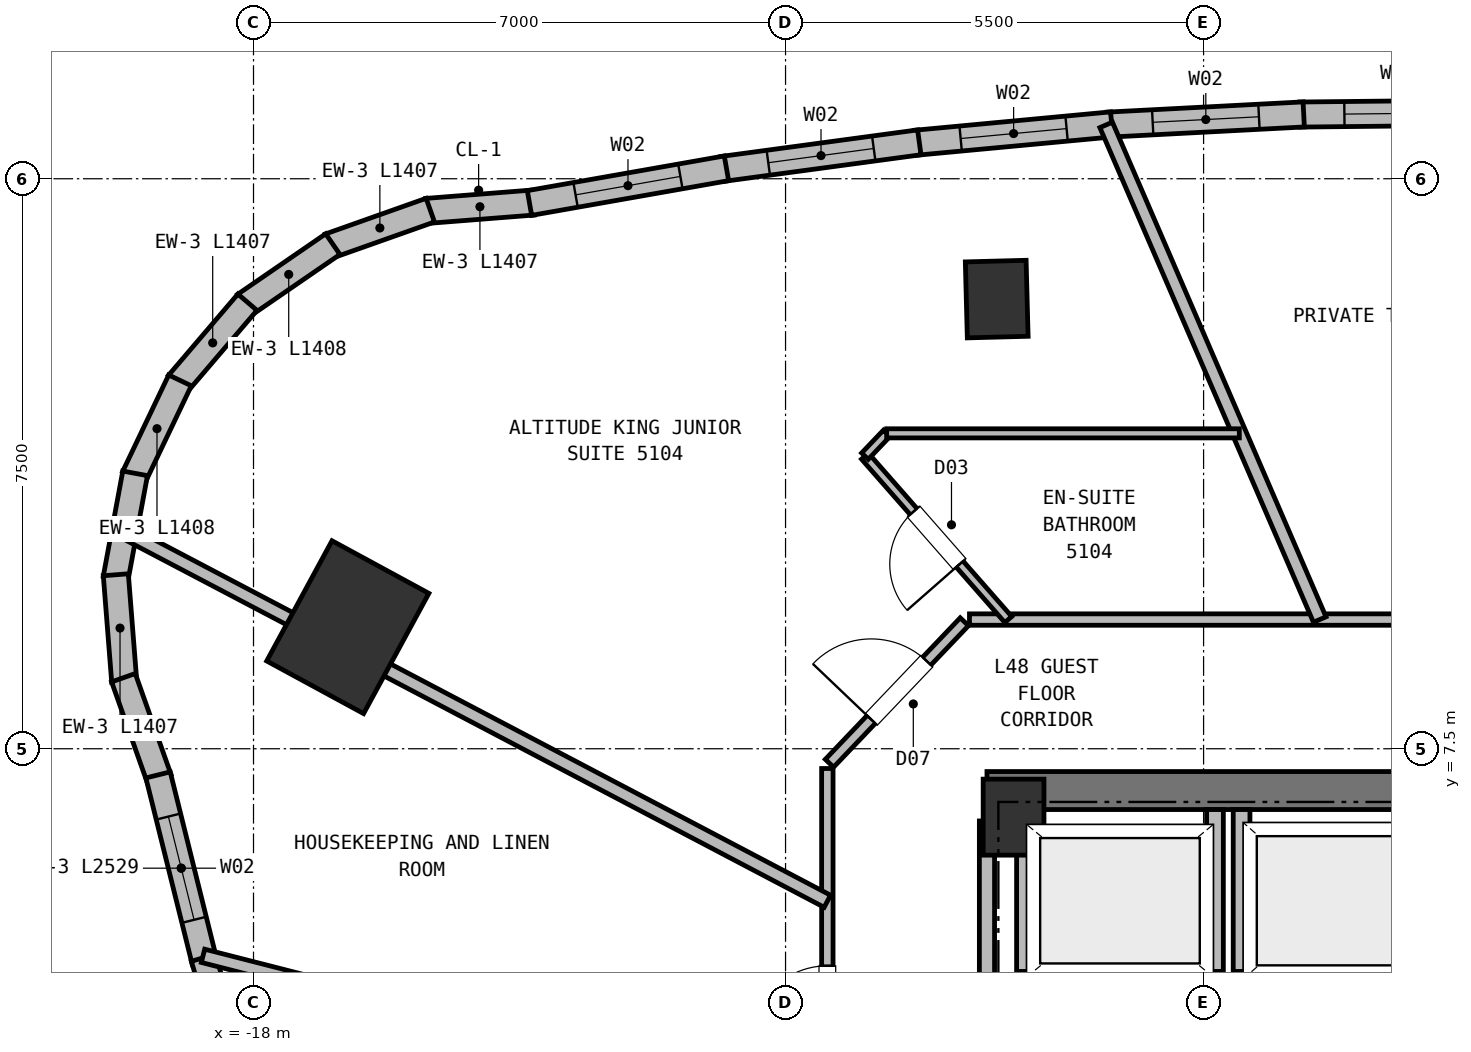
"""IFC4 building model, lengths in metres.
Left out: names, types, materials, properties, quantities, classifications, styles, units other than length and angle.
Written with IfcOpenShell. Run it as: python <this file> out.ifc"""

import sys

from ifc_helpers import new_model, si_unit, direction, frame, frame_2d, origin, origin_2d, place, context, subcontext, project, spatial, rectangle, extrude, element, fill, save


model = new_model("IFC4")
c1 = context("Model", 3, precision=1e-05, world=origin(), true_north=direction((0.0, 1.0)))
c2 = subcontext(c1, "Body", "Model", "MODEL_VIEW")
j1 = project(units=[si_unit("LENGTHUNIT", "METRE"), si_unit("PLANEANGLEUNIT", "RADIAN")], contexts=[c1])
p1 = place(None, origin())
s1 = spatial("IfcSite", under=j1, at=p1, CompositionType="ELEMENT")
p2 = place(p1, origin())
s2 = spatial("IfcBuilding", under=s1, at=p2, CompositionType="ELEMENT")
p3 = place(p2, frame((0.0, 0.0, 194.15)))
s3 = spatial("IfcBuildingStorey", under=s2, at=p3, CompositionType="ELEMENT", Elevation=194.15)
p4 = place(p3, frame((-8.0, 6.6, 0.0), z_axis=(0.0, 0.0, 1.0), x_axis=(1.0, 0.0, 0.0)))
e1 = element("IfcColumn", 1, at=p4, inside=s3, PredefinedType="COLUMN", context=c2, shape_type="SweptSolid", body=[
    extrude(rectangle(XDim=0.8, YDim=1.0, at=origin_2d()), origin(), (0.0, 0.0, 1.0), 3.8),
])
p5 = place(p3, frame((-8.35, 6.95, 0.0), z_axis=(0.0, 0.0, 1.0), x_axis=(1.0, 0.0, 0.0)))
e2 = element("IfcWall", 2, at=p5, inside=s3, PredefinedType="SHEAR", context=c2, shape_type="SweptSolid", body=[
    extrude(rectangle(XDim=16.7, YDim=0.5, at=frame_2d((8.35, 0.0))), origin(), (0.0, 0.0, 1.0), 3.55),
])
p6 = place(p3, frame((-16.76, 9.1, 0.0), z_axis=(0.0, 0.0, 1.0), x_axis=(-0.878817112662, 0.47715876026, 0.0)))
e3 = element("IfcColumn", 3, at=p6, inside=s3, PredefinedType="COLUMN", context=c2, shape_type="SweptSolid", body=[
    extrude(rectangle(XDim=1.45, YDim=1.8, at=origin_2d()), origin(), (0.0, 0.0, 1.0), 3.8),
])
p7 = place(p3, frame((-8.222, 13.417, 0.0), z_axis=(0.0, 0.0, 1.0), x_axis=(0.999657324976, 0.026176948308, 0.0)))
e4 = element("IfcColumn", 4, at=p7, inside=s3, PredefinedType="COLUMN", context=c2, shape_type="SweptSolid", body=[
    extrude(rectangle(XDim=0.8, YDim=1.0, at=origin_2d()), origin(), (0.0, 0.0, 1.0), 3.8),
])
p8 = place(p3, frame((-15.723, 14.576, 0.0), z_axis=(0.0, 0.0, 1.0), x_axis=(0.996907811278, 0.07857999626, 0.0)))
e5 = element("IfcWall", 5, at=p8, inside=s3, PredefinedType="SOLIDWALL", context=c2, shape_type="SweptSolid", body=[
    extrude(rectangle(XDim=1.407, YDim=0.33, at=frame_2d((0.704, 0.0))), origin(), (0.0, 0.0, 1.0), 3.55),
])
p9 = place(p3, frame((-17.001, 14.117, 0.0), z_axis=(0.0, 0.0, 1.0), x_axis=(0.942676111555, 0.333709077945, 0.0)))
e6 = element("IfcWall", 6, at=p9, inside=s3, PredefinedType="SOLIDWALL", context=c2, shape_type="SweptSolid", body=[
    extrude(rectangle(XDim=1.408, YDim=0.33, at=frame_2d((0.704, 0.0))), origin(), (0.0, 0.0, 1.0), 3.55),
])
for number, where, z_axis, x_axis in (
    (7, (-18.117, 13.342, 0.0), (0.0, 0.0, 1.0), (0.824, 0.566, 0.0)),
    (8, (-18.994, 12.305, 0.0), (0.0, 0.0, 1.0), (0.649, 0.76, 0.0)),
    (9, (-19.573, 11.076, 0.0), (0.0, 0.0, 1.0), (0.431, 0.902, 0.0)),
    (10, (-19.814, 9.74, 0.0), (0.0, 0.0, 1.0), (0.182, 0.983, 0.0)),
):
    element("IfcWall", number, at=place(p3, frame(where, z_axis=z_axis, x_axis=x_axis)), inside=s3, PredefinedType="SOLIDWALL", context=c2, shape_type="SweptSolid", body=[
        extrude(rectangle(XDim=1.407, YDim=0.33, at=frame_2d((0.704, 0.0))), origin(), (0.0, 0.0, 1.0), 3.55),
    ])
p10 = place(p3, frame((-19.701, 8.386, 0.0), z_axis=(0.0, 0.0, 1.0), x_axis=(-0.078566409812, 0.99690888212, 0.0)))
e11 = element("IfcWall", 11, at=p10, inside=s3, PredefinedType="SOLIDWALL", context=c2, shape_type="SweptSolid", body=[
    extrude(rectangle(XDim=1.408, YDim=0.33, at=frame_2d((0.704, 0.0))), origin(), (0.0, 0.0, 1.0), 3.55),
])
p11 = place(p3, frame((-19.241, 7.108, 0.0), z_axis=(0.0, 0.0, 1.0), x_axis=(-0.33376364871, 0.942656791627, 0.0)))
e12 = element("IfcWall", 12, at=p11, inside=s3, PredefinedType="SOLIDWALL", context=c2, shape_type="SweptSolid", body=[
    extrude(rectangle(XDim=1.407, YDim=0.33, at=frame_2d((0.704, 0.0))), origin(), (0.0, 0.0, 1.0), 3.55),
])
p12 = place(p3, frame((-18.646, 4.701, 0.0), z_axis=(0.0, 0.0, 1.0), x_axis=(-0.241149785718, 0.970487908656, 0.0)))
e13 = element("IfcWall", 13, at=p12, inside=s3, PredefinedType="SOLIDWALL", context=c2, shape_type="SweptSolid", body=[
    extrude(rectangle(XDim=2.529, YDim=0.33, at=frame_2d((1.265, 0.0))), origin(), (0.0, 0.0, 1.0), 3.55),
])
p13 = place(p12, frame((0.564, 0.0, 0.72)))
e14 = element("IfcOpeningElement", 14, at=p13, cuts=e13, PredefinedType="OPENING", context=c2, shape_type="SweptSolid", body=[
    extrude(rectangle(XDim=1.4, YDim=1.84, at=frame_2d((0.7, 0.92))), frame((0.0, 0.175, 0.0), z_axis=(0.0, -1.0, 0.0), x_axis=(1.0, 0.0, 0.0)), (0.0, 0.0, 1.0), 0.35),
])
p14 = place(p3, frame((-17.96, 2.34, 0.0), z_axis=(0.0, 0.0, 1.0), x_axis=(-0.278497522166, 0.960436947513, 0.0)))
e15 = element("IfcWall", 15, at=p14, inside=s3, PredefinedType="SOLIDWALL", context=c2, shape_type="SweptSolid", body=[
    extrude(rectangle(XDim=2.509, YDim=0.33, at=frame_2d((1.254, 0.0))), origin(), (0.0, 0.0, 1.0), 3.55),
])
p15 = place(p14, frame((0.554, 0.0, 0.72)))
e16 = element("IfcOpeningElement", 16, at=p15, cuts=e15, PredefinedType="OPENING", context=c2, shape_type="SweptSolid", body=[
    extrude(rectangle(XDim=1.4, YDim=1.84, at=frame_2d((0.7, 0.92))), frame((0.0, 0.175, 0.0), z_axis=(0.0, -1.0, 0.0), x_axis=(1.0, 0.0, 0.0)), (0.0, 0.0, 1.0), 0.35),
])
p16 = place(p3, frame((-4.233, 15.845, 0.0), z_axis=(0.0, 0.0, 1.0), x_axis=(0.999945431053, 0.010446765829, 0.0)))
e17 = element("IfcWall", 17, at=p16, inside=s3, PredefinedType="SOLIDWALL", context=c2, shape_type="SweptSolid", body=[
    extrude(rectangle(XDim=2.571, YDim=0.33, at=frame_2d((1.285, 0.0))), origin(), (0.0, 0.0, 1.0), 3.55),
])
p17 = place(p16, frame((0.585, 0.0, 0.72)))
e18 = element("IfcOpeningElement", 18, at=p17, cuts=e17, PredefinedType="OPENING", context=c2, shape_type="SweptSolid", body=[
    extrude(rectangle(XDim=1.4, YDim=1.84, at=frame_2d((0.7, 0.92))), frame((0.0, 0.175, 0.0), z_axis=(0.0, -1.0, 0.0), x_axis=(1.0, 0.0, 0.0)), (0.0, 0.0, 1.0), 0.35),
])
p18 = place(p3, frame((-6.759, 15.712, 0.0), z_axis=(0.0, 0.0, 1.0), x_axis=(0.998644110944, 0.052057080942, 0.0)))
e19 = element("IfcWall", 19, at=p18, inside=s3, PredefinedType="SOLIDWALL", context=c2, shape_type="SweptSolid", body=[
    extrude(rectangle(XDim=2.579, YDim=0.33, at=frame_2d((1.29, 0.0))), origin(), (0.0, 0.0, 1.0), 3.55),
])
p19 = place(p18, frame((0.59, 0.0, 0.72)))
e20 = element("IfcOpeningElement", 20, at=p19, cuts=e19, PredefinedType="OPENING", context=c2, shape_type="SweptSolid", body=[
    extrude(rectangle(XDim=1.4, YDim=1.84, at=frame_2d((0.7, 0.92))), frame((0.0, 0.175, 0.0), z_axis=(0.0, -1.0, 0.0), x_axis=(1.0, 0.0, 0.0)), (0.0, 0.0, 1.0), 0.35),
])
p20 = place(p3, frame((-9.29, 15.473, 0.0), z_axis=(0.0, 0.0, 1.0), x_axis=(0.9956361402, 0.093320288938, 0.0)))
e21 = element("IfcWall", 21, at=p20, inside=s3, PredefinedType="SOLIDWALL", context=c2, shape_type="SweptSolid", body=[
    extrude(rectangle(XDim=2.593, YDim=0.33, at=frame_2d((1.296, 0.0))), origin(), (0.0, 0.0, 1.0), 3.55),
])
p21 = place(p20, frame((0.596, 0.0, 0.72)))
e22 = element("IfcOpeningElement", 22, at=p21, cuts=e21, PredefinedType="OPENING", context=c2, shape_type="SweptSolid", body=[
    extrude(rectangle(XDim=1.4, YDim=1.84, at=frame_2d((0.7, 0.92))), frame((0.0, 0.175, 0.0), z_axis=(0.0, -1.0, 0.0), x_axis=(1.0, 0.0, 0.0)), (0.0, 0.0, 1.0), 0.35),
])
p22 = place(p3, frame((-11.827, 15.13, 0.0), z_axis=(0.0, 0.0, 1.0), x_axis=(0.991012550784, 0.133768920863, 0.0)))
e23 = element("IfcWall", 23, at=p22, inside=s3, PredefinedType="SOLIDWALL", context=c2, shape_type="SweptSolid", body=[
    extrude(rectangle(XDim=2.61, YDim=0.33, at=frame_2d((1.305, 0.0))), origin(), (0.0, 0.0, 1.0), 3.55),
])
p23 = place(p22, frame((0.605, 0.0, 0.72)))
e24 = element("IfcOpeningElement", 24, at=p23, cuts=e23, PredefinedType="OPENING", context=c2, shape_type="SweptSolid", body=[
    extrude(rectangle(XDim=1.4, YDim=1.84, at=frame_2d((0.7, 0.92))), frame((0.0, 0.175, 0.0), z_axis=(0.0, -1.0, 0.0), x_axis=(1.0, 0.0, 0.0)), (0.0, 0.0, 1.0), 0.35),
])
p24 = place(p3, frame((-14.369, 14.681, 0.0), z_axis=(0.0, 0.0, 1.0), x_axis=(0.984819029835, 0.173584211476, 0.0)))
e25 = element("IfcWall", 25, at=p24, inside=s3, PredefinedType="SOLIDWALL", context=c2, shape_type="SweptSolid", body=[
    extrude(rectangle(XDim=2.632, YDim=0.33, at=frame_2d((1.316, 0.0))), origin(), (0.0, 0.0, 1.0), 3.55),
])
p25 = place(p24, frame((0.616, 0.0, 0.72)))
e26 = element("IfcOpeningElement", 26, at=p25, cuts=e25, PredefinedType="OPENING", context=c2, shape_type="SweptSolid", body=[
    extrude(rectangle(XDim=1.4, YDim=1.84, at=frame_2d((0.7, 0.92))), frame((0.0, 0.175, 0.0), z_axis=(0.0, -1.0, 0.0), x_axis=(1.0, 0.0, 0.0)), (0.0, 0.0, 1.0), 0.35),
])
p26 = place(p3, frame((-7.85, 4.45, 0.0), z_axis=(0.0, 0.0, 1.0), x_axis=(1.0, 0.0, 0.0)))
e27 = element("IfcWall", 27, at=p26, inside=s3, PredefinedType="PARTITIONING", context=c2, shape_type="SweptSolid", body=[
    extrude(rectangle(XDim=2.5, YDim=0.22, at=frame_2d((1.25, 0.0))), origin(), (0.0, 0.0, 1.0), 3.55),
])
p27 = place(p26, frame((0.66, 0.0, 0.0)))
e28 = element("IfcOpeningElement", 28, at=p27, cuts=e27, PredefinedType="OPENING", context=c2, shape_type="SweptSolid", body=[
    extrude(rectangle(XDim=1.18, YDim=2.15, at=frame_2d((0.59, 1.075))), frame((0.0, 0.12, 0.0), z_axis=(0.0, -1.0, 0.0), x_axis=(1.0, 0.0, 0.0)), (0.0, 0.0, 1.0), 0.24),
])
p28 = place(p3, frame((-7.85, 4.57, 0.0), z_axis=(0.0, 0.0, 1.0), x_axis=(0.0, 1.0, 0.0)))
e29 = element("IfcWall", 29, at=p28, inside=s3, PredefinedType="PARTITIONING", context=c2, shape_type="SweptSolid", body=[
    extrude(rectangle(XDim=2.13, YDim=0.22, at=frame_2d((1.065, 0.0))), origin(), (0.0, 0.0, 1.0), 3.18),
])
p29 = place(p3, frame((-5.35, 4.57, 0.0), z_axis=(0.0, 0.0, 1.0), x_axis=(0.0, 1.0, 0.0)))
e30 = element("IfcWall", 30, at=p29, inside=s3, PredefinedType="PARTITIONING", context=c2, shape_type="SweptSolid", body=[
    extrude(rectangle(XDim=2.13, YDim=0.22, at=frame_2d((1.065, 0.0))), origin(), (0.0, 0.0, 1.0), 3.55),
])
p30 = place(p3, frame((-5.0, 4.45, 0.0), z_axis=(0.0, 0.0, 1.0), x_axis=(1.0, 0.0, 0.0)))
e31 = element("IfcWall", 31, at=p30, inside=s3, PredefinedType="PARTITIONING", context=c2, shape_type="SweptSolid", body=[
    extrude(rectangle(XDim=2.4, YDim=0.22, at=frame_2d((1.2, 0.0))), origin(), (0.0, 0.0, 1.0), 3.55),
])
p31 = place(p30, frame((0.28, 0.0, 0.0)))
e32 = element("IfcOpeningElement", 32, at=p31, cuts=e31, PredefinedType="OPENING", context=c2, shape_type="SweptSolid", body=[
    extrude(rectangle(XDim=1.22, YDim=2.15, at=frame_2d((0.61, 1.075))), frame((0.0, 0.12, 0.0), z_axis=(0.0, -1.0, 0.0), x_axis=(1.0, 0.0, 0.0)), (0.0, 0.0, 1.0), 0.24),
])
p32 = place(p3, frame((-5.0, 4.57, 0.0), z_axis=(0.0, 0.0, 1.0), x_axis=(0.0, 1.0, 0.0)))
e33 = element("IfcWall", 33, at=p32, inside=s3, PredefinedType="PARTITIONING", context=c2, shape_type="SweptSolid", body=[
    extrude(rectangle(XDim=2.13, YDim=0.22, at=frame_2d((1.065, 0.0))), origin(), (0.0, 0.0, 1.0), 3.55),
])
p33 = place(p3, frame((-8.35, 1.15, 0.0), z_axis=(0.0, 0.0, 1.0), x_axis=(0.0, 1.0, 0.0)))
e34 = element("IfcWall", 34, at=p33, inside=s3, PredefinedType="PARTITIONING", context=c2, shape_type="SweptSolid", body=[
    extrude(rectangle(XDim=5.4, YDim=0.2, at=frame_2d((2.7, 0.0))), origin(), (0.0, 0.0, 1.0), 3.55),
])
p34 = place(p33, frame((0.95, 0.0, 0.0)))
e35 = element("IfcOpeningElement", 35, at=p34, cuts=e34, PredefinedType="OPENING", context=c2, shape_type="SweptSolid", body=[
    extrude(rectangle(XDim=1.15, YDim=2.15, at=frame_2d((0.575, 1.075))), frame((0.0, 0.11, 0.0), z_axis=(0.0, -1.0, 0.0), x_axis=(1.0, 0.0, 0.0)), (0.0, 0.0, 1.0), 0.22),
])
p35 = place(p3, frame((-8.58, 9.2, 0.0), z_axis=(0.0, 0.0, 1.0), x_axis=(1.0, 0.0, 0.0)))
e36 = element("IfcWall", 36, at=p35, inside=s3, PredefinedType="PARTITIONING", context=c2, shape_type="SweptSolid", body=[
    extrude(rectangle(XDim=17.16, YDim=0.15, at=frame_2d((8.58, 0.0))), origin(), (0.0, 0.0, 1.0), 3.55),
])
p36 = place(p35, frame((7.008, 0.0, 0.0)))
e37 = element("IfcOpeningElement", 37, at=p36, cuts=e36, PredefinedType="OPENING", context=c2, shape_type="SweptSolid", body=[
    extrude(rectangle(XDim=1.0, YDim=2.15, at=frame_2d((0.5, 1.075))), frame((0.0, 0.085, 0.0), z_axis=(0.0, -1.0, 0.0), x_axis=(1.0, 0.0, 0.0)), (0.0, 0.0, 1.0), 0.17),
])
p37 = place(p35, frame((13.189, 0.0, 0.0)))
e38 = element("IfcOpeningElement", 38, at=p37, cuts=e36, PredefinedType="OPENING", context=c2, shape_type="SweptSolid", body=[
    extrude(rectangle(XDim=1.0, YDim=2.15, at=frame_2d((0.5, 1.075))), frame((0.0, 0.085, 0.0), z_axis=(0.0, -1.0, 0.0), x_axis=(1.0, 0.0, 0.0)), (0.0, 0.0, 1.0), 0.17),
])
p38 = place(p3, frame((-10.422, 7.309, 0.0), z_axis=(0.0, 0.0, 1.0), x_axis=(0.689960858356, 0.723846678473, 0.0)))
e39 = element("IfcWall", 39, at=p38, inside=s3, PredefinedType="PARTITIONING", context=c2, shape_type="SweptSolid", body=[
    extrude(rectangle(XDim=2.572, YDim=0.15, at=frame_2d((1.286, 0.0))), origin(), (0.0, 0.0, 1.0), 3.55),
])
p39 = place(p38, frame((0.796, 0.0, 0.0)))
e40 = element("IfcOpeningElement", 40, at=p39, cuts=e39, PredefinedType="OPENING", context=c2, shape_type="SweptSolid", body=[
    extrude(rectangle(XDim=1.06, YDim=2.15, at=frame_2d((0.53, 1.075))), frame((0.0, 0.085, 0.0), z_axis=(0.0, -1.0, 0.0), x_axis=(1.0, 0.0, 0.0)), (0.0, 0.0, 1.0), 0.17),
])
p40 = place(p3, frame((-10.45, -7.24, 0.0), z_axis=(0.0, 0.0, 1.0), x_axis=(0.0, 1.0, 0.0)))
e41 = element("IfcWall", 41, at=p40, inside=s3, PredefinedType="PARTITIONING", context=c2, shape_type="SweptSolid", body=[
    extrude(rectangle(XDim=14.48, YDim=0.15, at=frame_2d((7.24, 0.0))), origin(), (0.0, 0.0, 1.0), 3.23),
])
p41 = place(p40, frame((8.243, 0.0, 0.0)))
e42 = element("IfcOpeningElement", 42, at=p41, cuts=e41, PredefinedType="OPENING", context=c2, shape_type="SweptSolid", body=[
    extrude(rectangle(XDim=0.95, YDim=2.1, at=frame_2d((0.475, 1.05))), frame((0.0, 0.085, 0.0), z_axis=(0.0, -1.0, 0.0), x_axis=(1.0, 0.0, 0.0)), (0.0, 0.0, 1.0), 0.17),
])
p42 = place(p40, frame((10.884, 0.0, 0.0)))
e43 = element("IfcOpeningElement", 43, at=p42, cuts=e41, PredefinedType="OPENING", context=c2, shape_type="SweptSolid", body=[
    extrude(rectangle(XDim=1.0, YDim=2.15, at=frame_2d((0.5, 1.075))), frame((0.0, 0.085, 0.0), z_axis=(0.0, -1.0, 0.0), x_axis=(1.0, 0.0, 0.0)), (0.0, 0.0, 1.0), 0.17),
])
p43 = place(p40, frame((3.349, 0.0, 0.0)))
e44 = element("IfcOpeningElement", 44, at=p43, cuts=e41, PredefinedType="OPENING", context=c2, shape_type="SweptSolid", body=[
    extrude(rectangle(XDim=1.0, YDim=2.15, at=frame_2d((0.5, 1.075))), frame((0.0, 0.085, 0.0), z_axis=(0.0, -1.0, 0.0), x_axis=(1.0, 0.0, 0.0)), (0.0, 0.0, 1.0), 0.17),
])
p44 = place(p3, frame((-3.972, 9.2, 0.0), z_axis=(0.0, 0.0, 1.0), x_axis=(-0.396382581843, 0.918085425661, 0.0)))
e45 = element("IfcWall", 45, at=p44, inside=s3, PredefinedType="PARTITIONING", context=c2, shape_type="SweptSolid", body=[
    extrude(rectangle(XDim=7.089, YDim=0.18, at=frame_2d((3.545, 0.0))), origin(), (0.0, 0.0, 1.0), 3.55),
])
p45 = place(p3, frame((-8.069, 9.2, 0.0), z_axis=(0.0, 0.0, 1.0), x_axis=(-0.659368411854, 0.751819990057, 0.0)))
e46 = element("IfcWall", 46, at=p45, inside=s3, PredefinedType="PARTITIONING", context=c2, shape_type="SweptSolid", body=[
    extrude(rectangle(XDim=2.86, YDim=0.12, at=frame_2d((1.43, 0.0))), origin(), (0.0, 0.0, 1.0), 3.55),
])
p46 = place(p45, frame((0.97, 0.0, 0.0)))
e47 = element("IfcOpeningElement", 47, at=p46, cuts=e46, PredefinedType="OPENING", context=c2, shape_type="SweptSolid", body=[
    extrude(rectangle(XDim=0.92, YDim=2.1, at=frame_2d((0.46, 1.05))), frame((0.0, 0.07, 0.0), z_axis=(0.0, -1.0, 0.0), x_axis=(1.0, 0.0, 0.0)), (0.0, 0.0, 1.0), 0.14),
])
p47 = place(p3, frame((-9.955, 11.35, 0.0), z_axis=(0.0, 0.0, 1.0), x_axis=(0.689802376572, 0.72399770806, 0.0)))
e48 = element("IfcWall", 48, at=p47, inside=s3, PredefinedType="PARTITIONING", context=c2, shape_type="SweptSolid", body=[
    extrude(rectangle(XDim=0.414, YDim=0.12, at=frame_2d((0.207, 0.0))), origin(), (0.0, 0.0, 1.0), 3.55),
])
p48 = place(p3, frame((-5.03, 11.65, 0.0), z_axis=(0.0, 0.0, 1.0), x_axis=(-1.0, 0.0, 0.0)))
e49 = element("IfcWall", 49, at=p48, inside=s3, PredefinedType="PARTITIONING", context=c2, shape_type="SweptSolid", body=[
    extrude(rectangle(XDim=4.64, YDim=0.12, at=frame_2d((2.32, 0.0))), origin(), (0.0, 0.0, 1.0), 3.55),
])
p49 = place(p3, frame((-10.45, 5.493, 0.0), z_axis=(0.0, 0.0, 1.0), x_axis=(-0.885159330624, 0.465288039187, 0.0)))
e50 = element("IfcWall", 50, at=p49, inside=s3, PredefinedType="PARTITIONING", context=c2, shape_type="SweptSolid", body=[
    extrude(rectangle(XDim=10.45, YDim=0.18, at=frame_2d((5.225, 0.0))), origin(), (0.0, 0.0, 1.0), 3.55),
])
p50 = place(p3, frame((-10.45, 2.674, 0.0), z_axis=(0.0, 0.0, 1.0), x_axis=(-0.968789680245, 0.247884157321, 0.0)))
e51 = element("IfcWall", 51, at=p50, inside=s3, PredefinedType="PARTITIONING", context=c2, shape_type="SweptSolid", body=[
    extrude(rectangle(XDim=8.479, YDim=0.18, at=frame_2d((4.24, 0.0))), origin(), (0.0, 0.0, 1.0), 3.55),
])
p51 = place(p13, origin())
e52 = element("IfcWindow", 52, at=p51, inside=s3, PartitioningType="SINGLE_PANEL", PredefinedType="WINDOW", context=c2, shape_type="SweptSolid", body=[
    extrude(rectangle(XDim=1.4, YDim=1.84, at=frame_2d((0.7, 0.92))), frame((0.0, 0.03, 0.0), z_axis=(0.0, -1.0, 0.0), x_axis=(1.0, 0.0, 0.0)), (0.0, 0.0, 1.0), 0.06),
])
fill(e14, e52)
p52 = place(p17, origin())
e53 = element("IfcWindow", 53, at=p52, inside=s3, PartitioningType="SINGLE_PANEL", PredefinedType="WINDOW", context=c2, shape_type="SweptSolid", body=[
    extrude(rectangle(XDim=1.4, YDim=1.84, at=frame_2d((0.7, 0.92))), frame((0.0, 0.03, 0.0), z_axis=(0.0, -1.0, 0.0), x_axis=(1.0, 0.0, 0.0)), (0.0, 0.0, 1.0), 0.06),
])
fill(e18, e53)
p53 = place(p19, origin())
e54 = element("IfcWindow", 54, at=p53, inside=s3, PartitioningType="SINGLE_PANEL", PredefinedType="WINDOW", context=c2, shape_type="SweptSolid", body=[
    extrude(rectangle(XDim=1.4, YDim=1.84, at=frame_2d((0.7, 0.92))), frame((0.0, 0.03, 0.0), z_axis=(0.0, -1.0, 0.0), x_axis=(1.0, 0.0, 0.0)), (0.0, 0.0, 1.0), 0.06),
])
fill(e20, e54)
p54 = place(p21, origin())
e55 = element("IfcWindow", 55, at=p54, inside=s3, PartitioningType="SINGLE_PANEL", PredefinedType="WINDOW", context=c2, shape_type="SweptSolid", body=[
    extrude(rectangle(XDim=1.4, YDim=1.84, at=frame_2d((0.7, 0.92))), frame((0.0, 0.03, 0.0), z_axis=(0.0, -1.0, 0.0), x_axis=(1.0, 0.0, 0.0)), (0.0, 0.0, 1.0), 0.06),
])
fill(e22, e55)
p55 = place(p23, origin())
e56 = element("IfcWindow", 56, at=p55, inside=s3, PartitioningType="SINGLE_PANEL", PredefinedType="WINDOW", context=c2, shape_type="SweptSolid", body=[
    extrude(rectangle(XDim=1.4, YDim=1.84, at=frame_2d((0.7, 0.92))), frame((0.0, 0.03, 0.0), z_axis=(0.0, -1.0, 0.0), x_axis=(1.0, 0.0, 0.0)), (0.0, 0.0, 1.0), 0.06),
])
fill(e24, e56)
p56 = place(p25, origin())
e57 = element("IfcWindow", 57, at=p56, inside=s3, PartitioningType="SINGLE_PANEL", PredefinedType="WINDOW", context=c2, shape_type="SweptSolid", body=[
    extrude(rectangle(XDim=1.4, YDim=1.84, at=frame_2d((0.7, 0.92))), frame((0.0, 0.03, 0.0), z_axis=(0.0, -1.0, 0.0), x_axis=(1.0, 0.0, 0.0)), (0.0, 0.0, 1.0), 0.06),
])
fill(e26, e57)
p57 = place(p46, origin())
e58 = element("IfcDoor", 58, at=p57, inside=s3, OperationType="SINGLE_SWING_LEFT", PredefinedType="DOOR", context=c2, shape_type="SweptSolid", body=[
    extrude(rectangle(XDim=0.92, YDim=2.1, at=frame_2d((0.46, 1.05))), frame((0.0, 0.025, 0.0), z_axis=(0.0, -1.0, 0.0), x_axis=(1.0, 0.0, 0.0)), (0.0, 0.0, 1.0), 0.05),
])
fill(e47, e58)
p58 = place(p42, origin())
e59 = element("IfcDoor", 59, at=p58, inside=s3, OperationType="SINGLE_SWING_LEFT", PredefinedType="DOOR", context=c2, shape_type="SweptSolid", body=[
    extrude(rectangle(XDim=1.0, YDim=2.15, at=frame_2d((0.5, 1.075))), frame((0.0, 0.025, 0.0), z_axis=(0.0, -1.0, 0.0), x_axis=(1.0, 0.0, 0.0)), (0.0, 0.0, 1.0), 0.05),
])
fill(e43, e59)
p59 = place(p39, origin())
e60 = element("IfcDoor", 60, at=p59, inside=s3, OperationType="SINGLE_SWING_LEFT", PredefinedType="DOOR", context=c2, shape_type="SweptSolid", body=[
    extrude(rectangle(XDim=1.06, YDim=2.15, at=frame_2d((0.53, 1.075))), frame((0.0, 0.025, 0.0), z_axis=(0.0, -1.0, 0.0), x_axis=(1.0, 0.0, 0.0)), (0.0, 0.0, 1.0), 0.05),
])
fill(e40, e60)
save(model, sys.argv[1])
